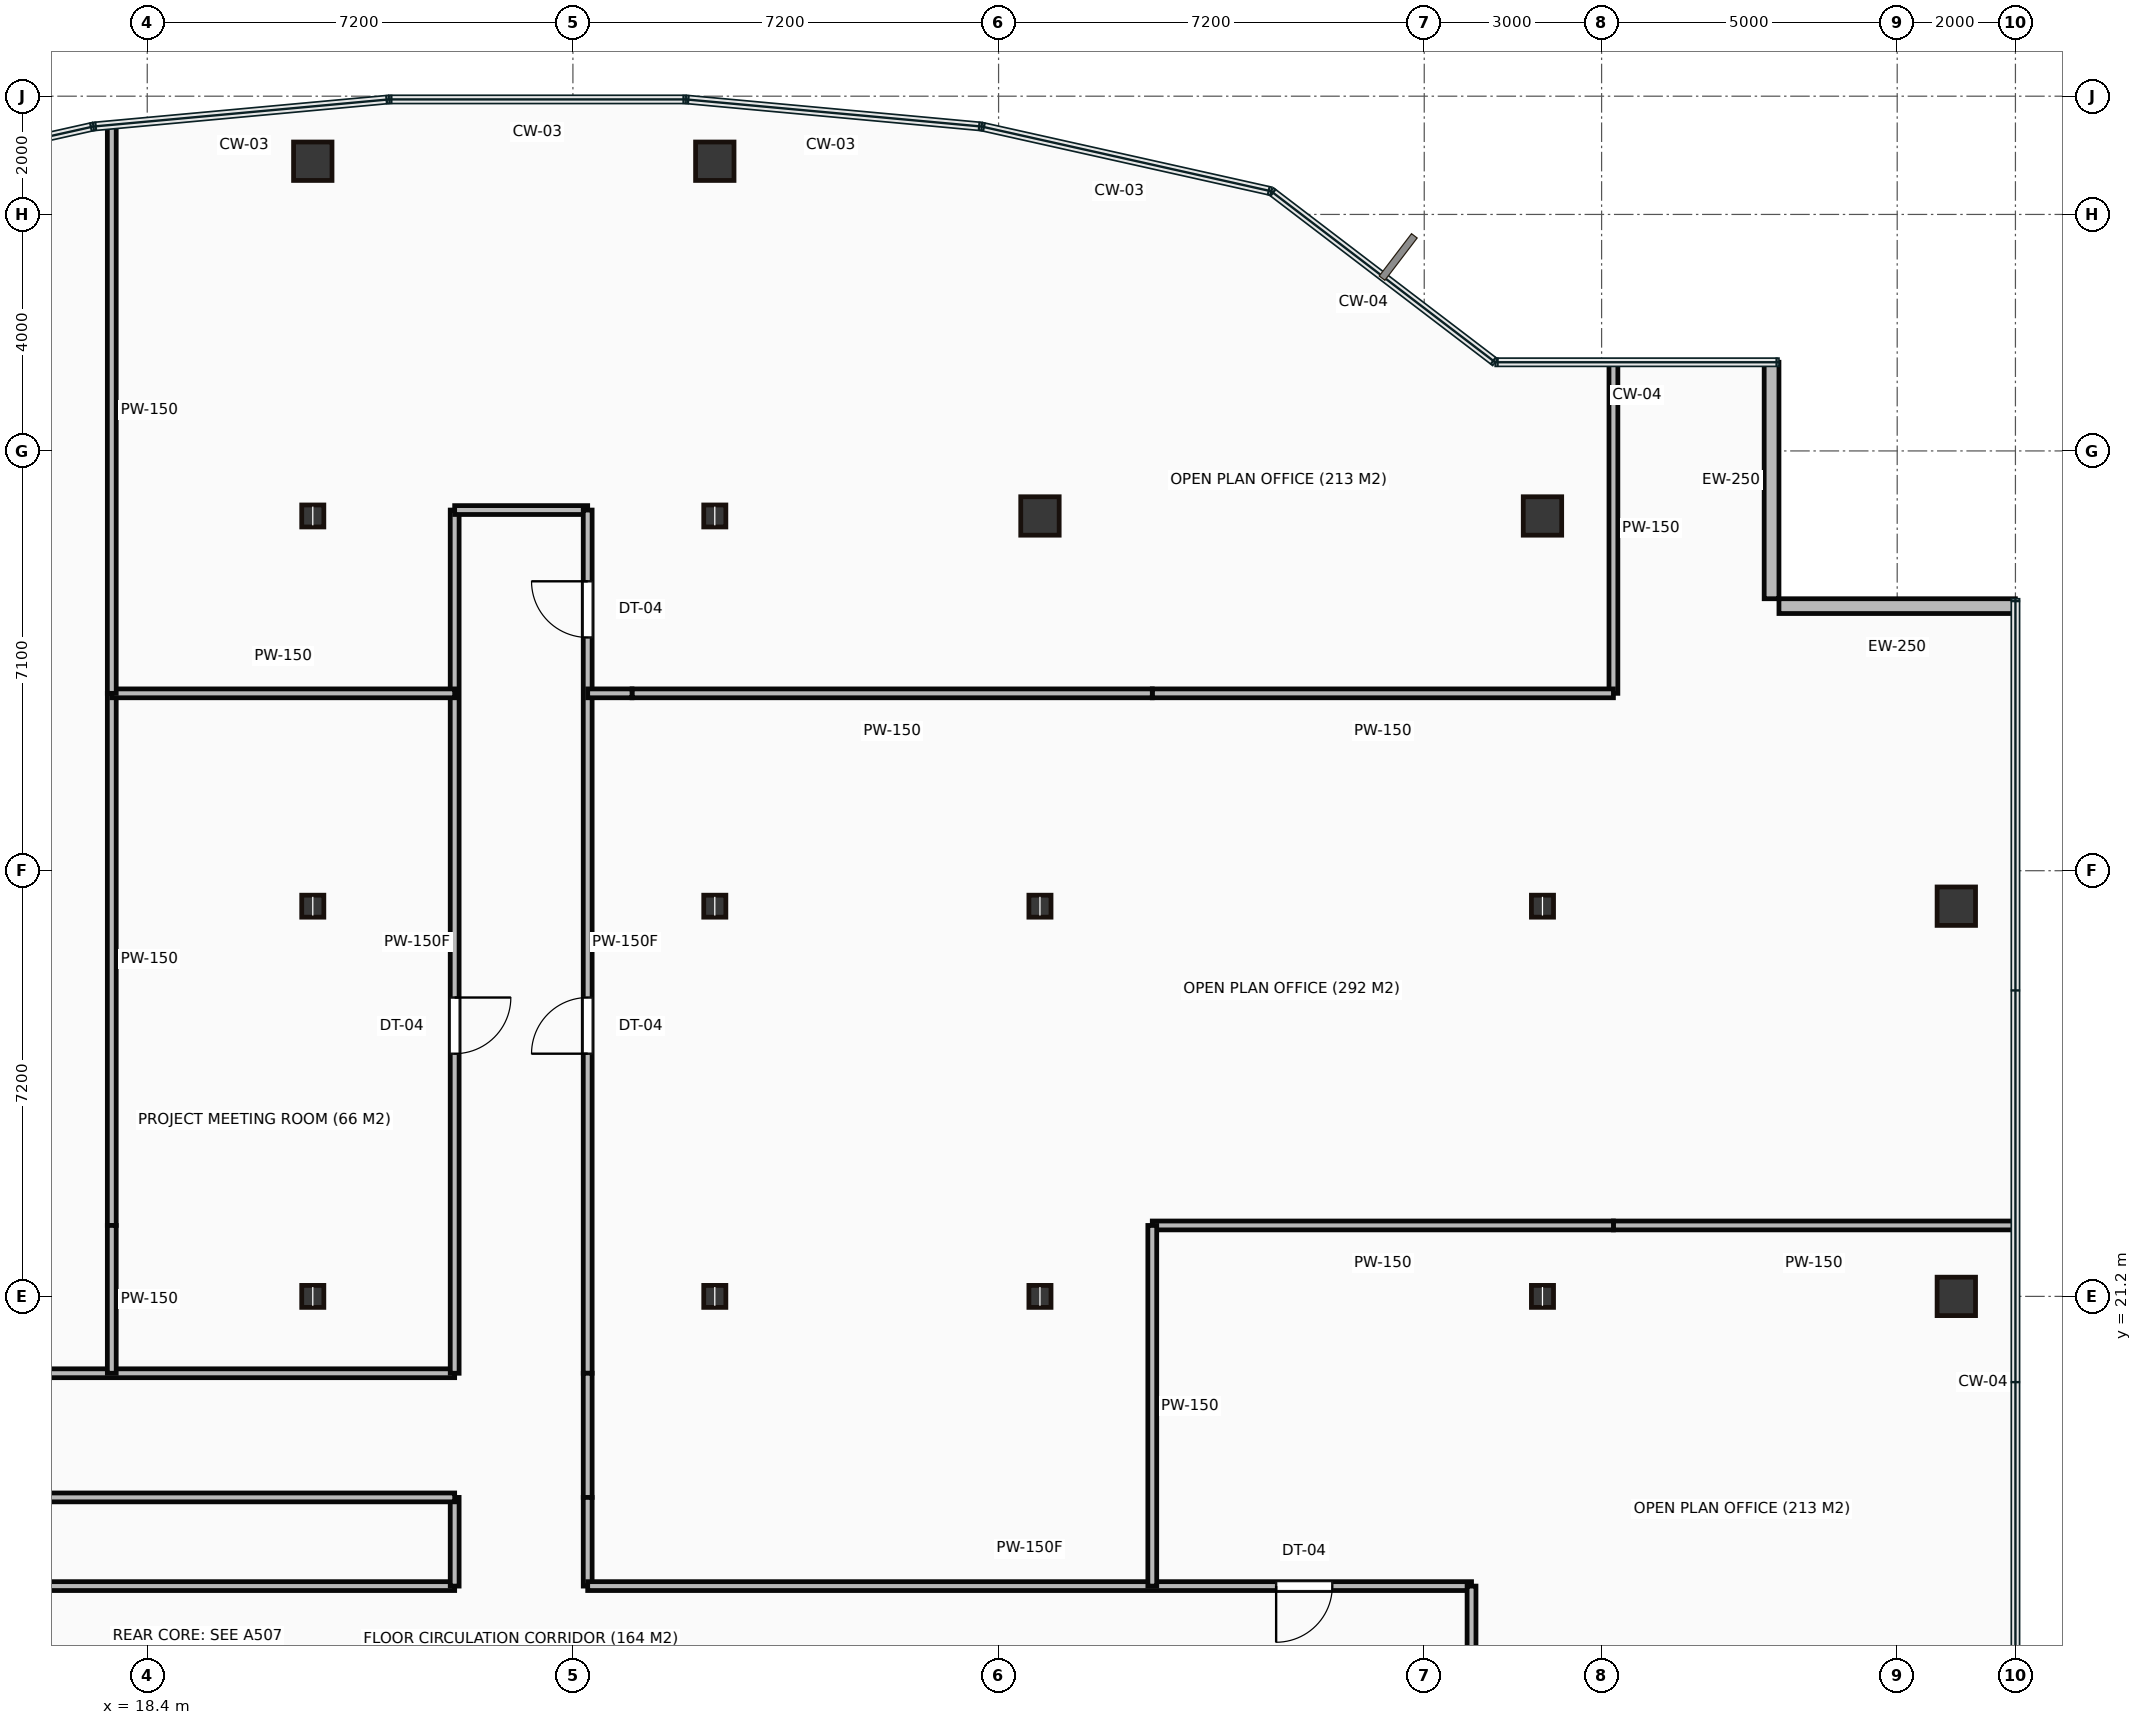
"""IFC4 building model, lengths in metres.
Left out: names, types, materials, properties, quantities, classifications, styles, units other than length and angle.
Written with IfcOpenShell. Run it as: python <this file> out.ifc"""

import sys

from ifc_helpers import new_model, si_unit, direction, frame, frame_2d, origin, origin_2d, place, context, subcontext, project, spatial, rectangle, hollow_rectangle, i_section, extrude, source, transform, mapped, element, fill, save


model = new_model("IFC4")
c1 = context("Model", 3, precision=1e-05, world=origin(), true_north=direction((0.0, 1.0)))
c2 = subcontext(c1, "Body", "Model", "MODEL_VIEW")
j1 = project(units=[si_unit("LENGTHUNIT", "METRE"), si_unit("PLANEANGLEUNIT", "RADIAN")], contexts=[c1])
p1 = place(None, origin())
s1 = spatial("IfcSite", under=j1, at=p1, CompositionType="ELEMENT")
p2 = place(p1, origin())
s2 = spatial("IfcBuilding", under=s1, at=p2, CompositionType="ELEMENT")
p3 = place(p2, frame((0.0, 0.0, 162.5)))
s3 = spatial("IfcBuildingStorey", under=s2, at=p3, CompositionType="ELEMENT", Elevation=162.5)
m1 = source(origin(), c2, "Body", "SweptSolid", [
    extrude(i_section(OverallWidth=0.374, OverallDepth=0.372, WebThickness=0.016, FlangeThickness=0.026, at=origin_2d()), origin(), (0.0, 0.0, 1.0), 3.65),
])
for number, where, z_axis, x_axis in (
    (1, (21.2, 21.2, 0.0), (0.0, 0.0, 1.0), (1.0, 0.0, 0.0)),
    (2, (21.2, 27.8, 0.0), (0.0, 0.0, 1.0), (1.0, 0.0, 0.0)),
    (3, (21.2, 34.4, 0.0), (0.0, 0.0, 1.0), (1.0, 0.0, 0.0)),
):
    element("IfcColumn", number, at=place(p3, frame(where, z_axis=z_axis, x_axis=x_axis)), inside=s3, PredefinedType="COLUMN", context=c2, shape_type="MappedRepresentation", body=[
        mapped(m1, transform((0.0, 0.0, 0.0))),
    ])
m2 = source(origin(), c2, "Body", "SweptSolid", [
    extrude(hollow_rectangle(XDim=0.65, YDim=0.65, WallThickness=0.032, at=origin_2d()), origin(), (0.0, 0.0, 1.0), 3.65),
])
p4 = place(p3, frame((21.2, 40.4, 0.0), z_axis=(0.0, 0.0, 1.0), x_axis=(1.0, 0.0, 0.0)))
e4 = element("IfcColumn", 4, at=p4, inside=s3, PredefinedType="COLUMN", context=c2, shape_type="MappedRepresentation", body=[
    mapped(m2, transform((0.0, 0.0, 0.0))),
])
for number, where, z_axis, x_axis in (
    (5, (28.0, 21.2, 0.0), (0.0, 0.0, 1.0), (1.0, 0.0, 0.0)),
    (6, (28.0, 27.8, 0.0), (0.0, 0.0, 1.0), (1.0, 0.0, 0.0)),
    (7, (28.0, 34.4, 0.0), (0.0, 0.0, 1.0), (1.0, 0.0, 0.0)),
):
    element("IfcColumn", number, at=place(p3, frame(where, z_axis=z_axis, x_axis=x_axis)), inside=s3, PredefinedType="COLUMN", context=c2, shape_type="MappedRepresentation", body=[
        mapped(m1, transform((0.0, 0.0, 0.0))),
    ])
p5 = place(p3, frame((28.0, 40.4, 0.0), z_axis=(0.0, 0.0, 1.0), x_axis=(1.0, 0.0, 0.0)))
e8 = element("IfcColumn", 8, at=p5, inside=s3, PredefinedType="COLUMN", context=c2, shape_type="MappedRepresentation", body=[
    mapped(m2, transform((0.0, 0.0, 0.0))),
])
for number, where, z_axis, x_axis in (
    (9, (33.5, 21.2, 0.0), (0.0, 0.0, 1.0), (1.0, 0.0, 0.0)),
    (10, (33.5, 27.8, 0.0), (0.0, 0.0, 1.0), (1.0, 0.0, 0.0)),
):
    element("IfcColumn", number, at=place(p3, frame(where, z_axis=z_axis, x_axis=x_axis)), inside=s3, PredefinedType="COLUMN", context=c2, shape_type="MappedRepresentation", body=[
        mapped(m1, transform((0.0, 0.0, 0.0))),
    ])
p6 = place(p3, frame((33.5, 34.4, 0.0), z_axis=(0.0, 0.0, 1.0), x_axis=(1.0, 0.0, 0.0)))
e11 = element("IfcColumn", 11, at=p6, inside=s3, PredefinedType="COLUMN", context=c2, shape_type="MappedRepresentation", body=[
    mapped(m2, transform((0.0, 0.0, 0.0))),
])
for number, where, z_axis, x_axis in (
    (12, (42.0, 21.2, 0.0), (0.0, 0.0, 1.0), (1.0, 0.0, 0.0)),
    (13, (42.0, 27.8, 0.0), (0.0, 0.0, 1.0), (1.0, 0.0, 0.0)),
):
    element("IfcColumn", number, at=place(p3, frame(where, z_axis=z_axis, x_axis=x_axis)), inside=s3, PredefinedType="COLUMN", context=c2, shape_type="MappedRepresentation", body=[
        mapped(m1, transform((0.0, 0.0, 0.0))),
    ])
for number, where, z_axis, x_axis in (
    (14, (42.0, 34.4, 0.0), (0.0, 0.0, 1.0), (1.0, 0.0, 0.0)),
    (15, (49.0, 21.2, 0.0), (0.0, 0.0, 1.0), (1.0, 0.0, 0.0)),
    (16, (49.0, 27.8, 0.0), (0.0, 0.0, 1.0), (1.0, 0.0, 0.0)),
):
    element("IfcColumn", number, at=place(p3, frame(where, z_axis=z_axis, x_axis=x_axis)), inside=s3, PredefinedType="COLUMN", context=c2, shape_type="MappedRepresentation", body=[
        mapped(m2, transform((0.0, 0.0, 0.0))),
    ])
m3 = source(origin(), c2, "Body", "SweptSolid", [
    extrude(rectangle(XDim=4.0, YDim=0.25, at=frame_2d((2.0, 0.0))), origin(), (0.0, 0.0, 1.0), 3.4),
])
for number, where, z_axis, x_axis in (
    (17, (50.0, 32.875, 0.0), (0.0, 0.0, 1.0), (-1.0, 0.0, 0.0)),
    (18, (45.875, 33.0, 0.0), (0.0, 0.0, 1.0), (0.0, 1.0, 0.0)),
):
    element("IfcWall", number, at=place(p3, frame(where, z_axis=z_axis, x_axis=x_axis)), inside=s3, PredefinedType="STANDARD", context=c2, shape_type="MappedRepresentation", body=[
        mapped(m3, transform((0.0, 0.0, 0.0))),
    ])
m4 = source(origin(), c2, "Body", "SweptSolid", [
    extrude(rectangle(XDim=19.0, YDim=0.15, at=frame_2d((9.5, 0.0))), origin(), (0.0, 0.0, 1.0), 3.4),
])
p7 = place(p3, frame((4.6, 16.3, 0.0), z_axis=(0.0, 0.0, 1.0), x_axis=(1.0, 0.0, 0.0)))
e19 = element("IfcWall", 19, at=p7, inside=s3, PredefinedType="PARTITIONING", context=c2, shape_type="MappedRepresentation", body=[
    mapped(m4, transform((0.0, 0.0, 0.0))),
])
p8 = place(p7, frame((9.025, 0.0, 0.0)))
e20 = element("IfcOpeningElement", 20, at=p8, cuts=e19, PredefinedType="OPENING", context=c2, shape_type="SweptSolid", body=[
    extrude(rectangle(XDim=0.95, YDim=2.15, at=frame_2d((0.475, 1.075))), frame((0.0, 0.085, 0.0), z_axis=(0.0, -1.0, 0.0), x_axis=(1.0, 0.0, 0.0)), (0.0, 0.0, 1.0), 0.17),
])
m5 = source(origin(), c2, "Body", "SweptSolid", [
    extrude(rectangle(XDim=1.5, YDim=0.15, at=frame_2d((0.75, 0.0))), origin(), (0.0, 0.0, 1.0), 3.4),
])
p9 = place(p3, frame((23.6, 16.3, 0.0), z_axis=(0.0, 0.0, 1.0), x_axis=(0.0, 1.0, 0.0)))
e21 = element("IfcWall", 21, at=p9, inside=s3, PredefinedType="PARTITIONING", context=c2, shape_type="MappedRepresentation", body=[
    mapped(m5, transform((0.0, 0.0, 0.0))),
])
for number, where, z_axis, x_axis in (
    (22, (23.6, 17.8, 0.0), (0.0, 0.0, 1.0), (-1.0, 0.0, 0.0)),
    (23, (4.6, 19.9, 0.0), (0.0, 0.0, 1.0), (1.0, 0.0, 0.0)),
):
    element("IfcWall", number, at=place(p3, frame(where, z_axis=z_axis, x_axis=x_axis)), inside=s3, PredefinedType="PARTITIONING", context=c2, shape_type="MappedRepresentation", body=[
        mapped(m4, transform((0.0, 0.0, 0.0))),
    ])
m6 = source(origin(), c2, "Body", "SweptSolid", [
    extrude(rectangle(XDim=14.6, YDim=0.15, at=frame_2d((7.3, 0.0))), origin(), (0.0, 0.0, 1.0), 3.4),
])
p10 = place(p3, frame((23.6, 19.9, 0.0), z_axis=(0.0, 0.0, 1.0), x_axis=(0.0, 1.0, 0.0)))
e24 = element("IfcWall", 24, at=p10, inside=s3, PredefinedType="PARTITIONING", context=c2, shape_type="MappedRepresentation", body=[
    mapped(m6, transform((0.0, 0.0, 0.0))),
])
p11 = place(p10, frame((5.405, 0.0, 0.0)))
e25 = element("IfcOpeningElement", 25, at=p11, cuts=e24, PredefinedType="OPENING", context=c2, shape_type="SweptSolid", body=[
    extrude(rectangle(XDim=0.95, YDim=2.15, at=frame_2d((0.475, 1.075))), frame((0.0, 0.085, 0.0), z_axis=(0.0, -1.0, 0.0), x_axis=(1.0, 0.0, 0.0)), (0.0, 0.0, 1.0), 0.17),
])
m7 = source(origin(), c2, "Body", "SweptSolid", [
    extrude(rectangle(XDim=2.25, YDim=0.15, at=frame_2d((1.125, 0.0))), origin(), (0.0, 0.0, 1.0), 2.76),
])
p12 = place(p3, frame((23.6, 34.5, 0.0), z_axis=(0.0, 0.0, 1.0), x_axis=(1.0, 0.0, 0.0)))
e26 = element("IfcWall", 26, at=p12, inside=s3, PredefinedType="PARTITIONING", context=c2, shape_type="MappedRepresentation", body=[
    mapped(m7, transform((0.0, 0.0, 0.0))),
])
p13 = place(p3, frame((25.85, 34.5, 0.0), z_axis=(0.0, 0.0, 1.0), x_axis=(0.0, -1.0, 0.0)))
e27 = element("IfcWall", 27, at=p13, inside=s3, PredefinedType="PARTITIONING", context=c2, shape_type="MappedRepresentation", body=[
    mapped(m6, transform((0.0, 0.0, 0.0))),
])
p14 = place(p13, frame((1.205, 0.0, 0.0)))
e28 = element("IfcOpeningElement", 28, at=p14, cuts=e27, PredefinedType="OPENING", context=c2, shape_type="SweptSolid", body=[
    extrude(rectangle(XDim=0.95, YDim=2.15, at=frame_2d((0.475, 1.075))), frame((0.0, 0.085, 0.0), z_axis=(0.0, -1.0, 0.0), x_axis=(1.0, 0.0, 0.0)), (0.0, 0.0, 1.0), 0.17),
])
p15 = place(p13, frame((8.245, 0.0, 0.0)))
e29 = element("IfcOpeningElement", 29, at=p15, cuts=e27, PredefinedType="OPENING", context=c2, shape_type="SweptSolid", body=[
    extrude(rectangle(XDim=0.95, YDim=2.15, at=frame_2d((0.475, 1.075))), frame((0.0, 0.085, 0.0), z_axis=(0.0, -1.0, 0.0), x_axis=(1.0, 0.0, 0.0)), (0.0, 0.0, 1.0), 0.17),
])
m8 = source(origin(), c2, "Body", "SweptSolid", [
    extrude(rectangle(XDim=2.1, YDim=0.15, at=frame_2d((1.05, 0.0))), origin(), (0.0, 0.0, 1.0), 3.4),
])
p16 = place(p3, frame((25.85, 19.9, 0.0), z_axis=(0.0, 0.0, 1.0), x_axis=(0.0, -1.0, 0.0)))
e30 = element("IfcWall", 30, at=p16, inside=s3, PredefinedType="PARTITIONING", context=c2, shape_type="MappedRepresentation", body=[
    mapped(m8, transform((0.0, 0.0, 0.0))),
])
p17 = place(p3, frame((25.85, 17.8, 0.0), z_axis=(0.0, 0.0, 1.0), x_axis=(0.0, -1.0, 0.0)))
e31 = element("IfcWall", 31, at=p17, inside=s3, PredefinedType="PARTITIONING", context=c2, shape_type="MappedRepresentation", body=[
    mapped(m5, transform((0.0, 0.0, 0.0))),
])
m9 = source(origin(), c2, "Body", "SweptSolid", [
    extrude(rectangle(XDim=14.95, YDim=0.15, at=frame_2d((7.475, 0.0))), origin(), (0.0, 0.0, 1.0), 3.4),
])
p18 = place(p3, frame((25.85, 16.3, 0.0), z_axis=(0.0, 0.0, 1.0), x_axis=(1.0, 0.0, 0.0)))
e32 = element("IfcWall", 32, at=p18, inside=s3, PredefinedType="PARTITIONING", context=c2, shape_type="MappedRepresentation", body=[
    mapped(m9, transform((0.0, 0.0, 0.0))),
])
p19 = place(p18, frame((11.645, 0.0, 0.0)))
e33 = element("IfcOpeningElement", 33, at=p19, cuts=e32, PredefinedType="OPENING", context=c2, shape_type="SweptSolid", body=[
    extrude(rectangle(XDim=0.95, YDim=2.15, at=frame_2d((0.475, 1.075))), frame((0.0, 0.085, 0.0), z_axis=(0.0, -1.0, 0.0), x_axis=(1.0, 0.0, 0.0)), (0.0, 0.0, 1.0), 0.17),
])
m10 = source(origin(), c2, "Body", "SweptSolid", [
    extrude(rectangle(XDim=2.3, YDim=0.15, at=frame_2d((1.15, 0.0))), origin(), (0.0, 0.0, 1.0), 3.4),
])
p20 = place(p3, frame((40.8, 16.3, 0.0), z_axis=(0.0, 0.0, 1.0), x_axis=(0.0, -1.0, 0.0)))
e34 = element("IfcWall", 34, at=p20, inside=s3, PredefinedType="PARTITIONING", context=c2, shape_type="MappedRepresentation", body=[
    mapped(m10, transform((0.0, 0.0, 0.0))),
])
m11 = source(origin(), c2, "Body", "SweptSolid", [
    extrude(rectangle(XDim=9.0, YDim=0.15, at=frame_2d((4.5, 0.0))), origin(), (0.0, 0.0, 1.0), 3.4),
])
p21 = place(p3, frame((17.8, 31.4, 0.0), z_axis=(0.0, 0.0, 1.0), x_axis=(0.0, -1.0, 0.0)))
e35 = element("IfcWall", 35, at=p21, inside=s3, PredefinedType="PARTITIONING", context=c2, shape_type="MappedRepresentation", body=[
    mapped(m11, transform((0.0, 0.0, 0.0))),
])
m12 = source(origin(), c2, "Body", "SweptSolid", [
    extrude(rectangle(XDim=2.5, YDim=0.15, at=frame_2d((1.25, 0.0))), origin(), (0.0, 0.0, 1.0), 3.4),
])
p22 = place(p3, frame((17.8, 22.4, 0.0), z_axis=(0.0, 0.0, 1.0), x_axis=(0.0, -1.0, 0.0)))
e36 = element("IfcWall", 36, at=p22, inside=s3, PredefinedType="PARTITIONING", context=c2, shape_type="MappedRepresentation", body=[
    mapped(m12, transform((0.0, 0.0, 0.0))),
])
m13 = source(origin(), c2, "Body", "SweptSolid", [
    extrude(rectangle(XDim=5.8, YDim=0.15, at=frame_2d((2.9, 0.0))), origin(), (0.0, 0.0, 1.0), 3.4),
])
p23 = place(p3, frame((17.8, 31.4, 0.0), z_axis=(0.0, 0.0, 1.0), x_axis=(1.0, 0.0, 0.0)))
e37 = element("IfcWall", 37, at=p23, inside=s3, PredefinedType="PARTITIONING", context=c2, shape_type="MappedRepresentation", body=[
    mapped(m13, transform((0.0, 0.0, 0.0))),
])
m14 = source(origin(), c2, "Body", "SweptSolid", [
    extrude(rectangle(XDim=9.596, YDim=0.15, at=frame_2d((4.798, 0.0))), origin(), (0.0, 0.0, 1.0), 3.4),
])
p24 = place(p3, frame((17.8, 40.996, 0.0), z_axis=(0.0, 0.0, 1.0), x_axis=(0.0, -1.0, 0.0)))
e38 = element("IfcWall", 38, at=p24, inside=s3, PredefinedType="PARTITIONING", context=c2, shape_type="MappedRepresentation", body=[
    mapped(m14, transform((0.0, 0.0, 0.0))),
])
m15 = source(origin(), c2, "Body", "SweptSolid", [
    extrude(rectangle(XDim=5.58, YDim=0.15, at=frame_2d((2.79, 0.0))), origin(), (0.0, 0.0, 1.0), 3.4),
])
p25 = place(p3, frame((43.2, 36.98, 0.0), z_axis=(0.0, 0.0, 1.0), x_axis=(0.0, -1.0, 0.0)))
e39 = element("IfcWall", 39, at=p25, inside=s3, PredefinedType="PARTITIONING", context=c2, shape_type="MappedRepresentation", body=[
    mapped(m15, transform((0.0, 0.0, 0.0))),
])
m16 = source(origin(), c2, "Body", "SweptSolid", [
    extrude(rectangle(XDim=7.8, YDim=0.15, at=frame_2d((3.9, 0.0))), origin(), (0.0, 0.0, 1.0), 3.4),
])
p26 = place(p3, frame((43.2, 31.4, 0.0), z_axis=(0.0, 0.0, 1.0), x_axis=(-1.0, 0.0, 0.0)))
e40 = element("IfcWall", 40, at=p26, inside=s3, PredefinedType="PARTITIONING", context=c2, shape_type="MappedRepresentation", body=[
    mapped(m16, transform((0.0, 0.0, 0.0))),
])
m17 = source(origin(), c2, "Body", "SweptSolid", [
    extrude(rectangle(XDim=8.8, YDim=0.15, at=frame_2d((4.4, 0.0))), origin(), (0.0, 0.0, 1.0), 3.4),
])
p27 = place(p3, frame((35.4, 31.4, 0.0), z_axis=(0.0, 0.0, 1.0), x_axis=(-1.0, 0.0, 0.0)))
e41 = element("IfcWall", 41, at=p27, inside=s3, PredefinedType="PARTITIONING", context=c2, shape_type="MappedRepresentation", body=[
    mapped(m17, transform((0.0, 0.0, 0.0))),
])
m18 = source(origin(), c2, "Body", "SweptSolid", [
    extrude(rectangle(XDim=0.75, YDim=0.15, at=frame_2d((0.375, 0.0))), origin(), (0.0, 0.0, 1.0), 3.4),
])
p28 = place(p3, frame((26.6, 31.4, 0.0), z_axis=(0.0, 0.0, 1.0), x_axis=(-1.0, 0.0, 0.0)))
e42 = element("IfcWall", 42, at=p28, inside=s3, PredefinedType="PARTITIONING", context=c2, shape_type="MappedRepresentation", body=[
    mapped(m18, transform((0.0, 0.0, 0.0))),
])
m19 = source(origin(), c2, "Body", "SweptSolid", [
    extrude(rectangle(XDim=6.78, YDim=0.15, at=frame_2d((3.39, 0.0))), origin(), (0.0, 0.0, 1.0), 3.4),
])
p29 = place(p3, frame((49.98, 22.4, 0.0), z_axis=(0.0, 0.0, 1.0), x_axis=(-1.0, 0.0, 0.0)))
e43 = element("IfcWall", 43, at=p29, inside=s3, PredefinedType="PARTITIONING", context=c2, shape_type="MappedRepresentation", body=[
    mapped(m19, transform((0.0, 0.0, 0.0))),
])
p30 = place(p3, frame((43.2, 22.4, 0.0), z_axis=(0.0, 0.0, 1.0), x_axis=(-1.0, 0.0, 0.0)))
e44 = element("IfcWall", 44, at=p30, inside=s3, PredefinedType="PARTITIONING", context=c2, shape_type="MappedRepresentation", body=[
    mapped(m16, transform((0.0, 0.0, 0.0))),
])
m20 = source(origin(), c2, "Body", "SweptSolid", [
    extrude(rectangle(XDim=6.1, YDim=0.15, at=frame_2d((3.05, 0.0))), origin(), (0.0, 0.0, 1.0), 3.4),
])
p31 = place(p3, frame((35.4, 22.4, 0.0), z_axis=(0.0, 0.0, 1.0), x_axis=(0.0, -1.0, 0.0)))
e45 = element("IfcWall", 45, at=p31, inside=s3, PredefinedType="PARTITIONING", context=c2, shape_type="MappedRepresentation", body=[
    mapped(m20, transform((0.0, 0.0, 0.0))),
])
m21 = source(origin(), c2, "Body", "SweptSolid", [
    extrude(rectangle(XDim=0.95, YDim=2.15, at=frame_2d((0.475, 1.075))), frame((0.0, 0.025, 0.0), z_axis=(0.0, -1.0, 0.0), x_axis=(1.0, 0.0, 0.0)), (0.0, 0.0, 1.0), 0.05),
])
p32 = place(p11, origin())
e46 = element("IfcDoor", 46, at=p32, inside=s3, OperationType="SINGLE_SWING_RIGHT", PredefinedType="DOOR", context=c2, shape_type="MappedRepresentation", body=[
    mapped(m21, transform((0.0, 0.0, 0.0))),
])
fill(e25, e46)
p33 = place(p14, origin())
e47 = element("IfcDoor", 47, at=p33, inside=s3, OperationType="SINGLE_SWING_LEFT", PredefinedType="DOOR", context=c2, shape_type="MappedRepresentation", body=[
    mapped(m21, transform((0.0, 0.0, 0.0))),
])
fill(e28, e47)
p34 = place(p15, origin())
e48 = element("IfcDoor", 48, at=p34, inside=s3, OperationType="SINGLE_SWING_RIGHT", PredefinedType="DOOR", context=c2, shape_type="MappedRepresentation", body=[
    mapped(m21, transform((0.0, 0.0, 0.0))),
])
fill(e29, e48)
p35 = place(p19, origin())
e49 = element("IfcDoor", 49, at=p35, inside=s3, OperationType="SINGLE_SWING_LEFT", PredefinedType="DOOR", context=c2, shape_type="MappedRepresentation", body=[
    mapped(m21, transform((0.0, 0.0, 0.0))),
])
fill(e33, e49)
save(model, sys.argv[1])
